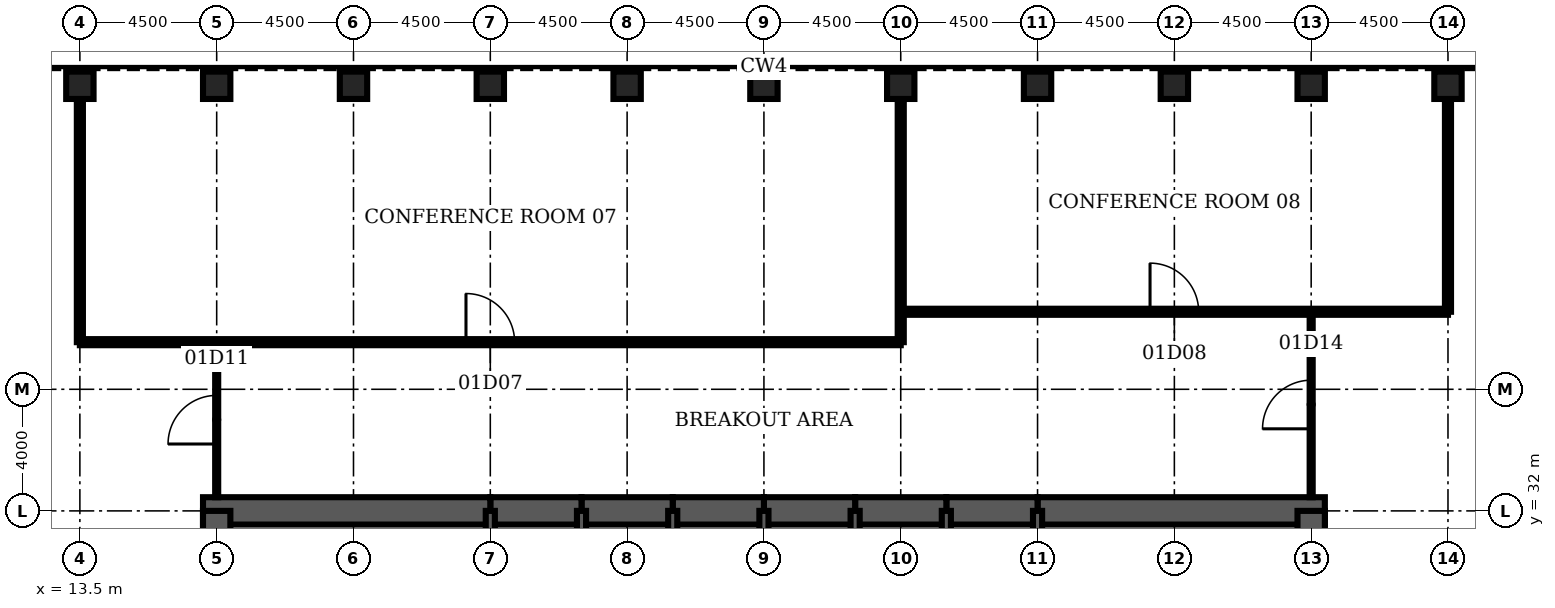
"""IFC4 building model, lengths in metres.
Left out: names, types, materials, properties, quantities, classifications, styles, units other than length and angle.
Written with IfcOpenShell. Run it as: python <this file> out.ifc"""

import sys

from ifc_helpers import new_model, si_unit, direction, frame, frame_2d, origin, origin_2d, place, context, subcontext, project, spatial, rectangle, hollow_rectangle, extrude, element, fill, save


model = new_model("IFC4")
c1 = context("Model", 3, precision=1e-05, world=origin(), true_north=direction((0.0, 1.0)))
c2 = subcontext(c1, "Body", "Model", "MODEL_VIEW")
j1 = project(units=[si_unit("LENGTHUNIT", "METRE"), si_unit("PLANEANGLEUNIT", "RADIAN")], contexts=[c1])
p1 = place(None, origin())
s1 = spatial("IfcSite", under=j1, at=p1, CompositionType="ELEMENT")
p2 = place(p1, origin())
s2 = spatial("IfcBuilding", under=s1, at=p2, CompositionType="ELEMENT")
p3 = place(p2, frame((0.0, 0.0, 6.0)))
s3 = spatial("IfcBuildingStorey", under=s2, at=p3, CompositionType="ELEMENT", Elevation=6.0)
for number, where, z_axis, x_axis in (
    (1, (58.5, 46.0, 0.0), (0.0, 0.0, 1.0), (0.0, 1.0, 0.0)),
    (2, (54.0, 46.0, 0.0), (0.0, 0.0, 1.0), (0.0, 1.0, 0.0)),
    (3, (49.5, 46.0, 0.0), (0.0, 0.0, 1.0), (0.0, 1.0, 0.0)),
    (4, (45.0, 46.0, 0.0), (0.0, 0.0, 1.0), (0.0, 1.0, 0.0)),
    (5, (40.5, 46.0, 0.0), (0.0, 0.0, 1.0), (0.0, 1.0, 0.0)),
    (6, (36.0, 46.0, 0.0), (0.0, 0.0, 1.0), (0.0, 1.0, 0.0)),
    (7, (31.5, 46.0, 0.0), (0.0, 0.0, 1.0), (0.0, 1.0, 0.0)),
    (8, (27.0, 46.0, 0.0), (0.0, 0.0, 1.0), (0.0, 1.0, 0.0)),
    (9, (22.5, 46.0, 0.0), (0.0, 0.0, 1.0), (0.0, 1.0, 0.0)),
    (10, (18.0, 46.0, 0.0), (0.0, 0.0, 1.0), (0.0, 1.0, 0.0)),
    (11, (13.5, 46.0, 0.0), (0.0, 0.0, 1.0), (0.0, 1.0, 0.0)),
):
    element("IfcColumn", number, at=place(p3, frame(where, z_axis=z_axis, x_axis=x_axis)), inside=s3, PredefinedType="COLUMN", context=c2, shape_type="SweptSolid", body=[
        extrude(hollow_rectangle(XDim=0.9, YDim=0.9, WallThickness=0.12, at=origin_2d()), origin(), (0.0, 0.0, 1.0), 7.0),
    ])
p4 = place(p3, frame((54.45, 32.0, 0.0), z_axis=(0.0, 0.0, 1.0), x_axis=(-1.0, 0.0, 0.0)))
e12 = element("IfcWall", 12, at=p4, inside=s3, PredefinedType="SHEAR", context=c2, shape_type="SweptSolid", body=[
    extrude(rectangle(XDim=9.45, YDim=0.9, at=frame_2d((4.725, 0.0))), origin(), (0.0, 0.0, 1.0), 7.0),
])
for number, where, z_axis, x_axis in (
    (13, (45.0, 32.0, 0.0), (0.0, 0.0, 1.0), (-1.0, 0.0, 0.0)),
    (14, (42.0, 32.0, 0.0), (0.0, 0.0, 1.0), (-1.0, 0.0, 0.0)),
    (15, (39.0, 32.0, 0.0), (0.0, 0.0, 1.0), (-1.0, 0.0, 0.0)),
    (16, (36.0, 32.0, 0.0), (0.0, 0.0, 1.0), (-1.0, 0.0, 0.0)),
    (17, (33.0, 32.0, 0.0), (0.0, 0.0, 1.0), (-1.0, 0.0, 0.0)),
    (18, (30.0, 32.0, 0.0), (0.0, 0.0, 1.0), (-1.0, 0.0, 0.0)),
):
    element("IfcWall", number, at=place(p3, frame(where, z_axis=z_axis, x_axis=x_axis)), inside=s3, PredefinedType="SHEAR", context=c2, shape_type="SweptSolid", body=[
        extrude(rectangle(XDim=3.0, YDim=0.9, at=frame_2d((1.5, 0.0))), origin(), (0.0, 0.0, 1.0), 7.0),
    ])
p5 = place(p3, frame((27.0, 32.0, 0.0), z_axis=(0.0, 0.0, 1.0), x_axis=(-1.0, 0.0, 0.0)))
e19 = element("IfcWall", 19, at=p5, inside=s3, PredefinedType="SHEAR", context=c2, shape_type="SweptSolid", body=[
    extrude(rectangle(XDim=9.45, YDim=0.9, at=frame_2d((4.725, 0.0))), origin(), (0.0, 0.0, 1.0), 7.0),
])
for number, where, z_axis, x_axis in (
    (20, (18.0, 32.0, 0.0), (0.0, 0.0, 1.0), (0.0, -1.0, 0.0)),
    (21, (54.0, 28.8, 0.0), (0.0, 0.0, 1.0), (0.0, 1.0, 0.0)),
):
    element("IfcWall", number, at=place(p3, frame(where, z_axis=z_axis, x_axis=x_axis)), inside=s3, PredefinedType="SHEAR", context=c2, shape_type="SweptSolid", body=[
        extrude(rectangle(XDim=3.2, YDim=0.9, at=frame_2d((1.6, 0.0))), origin(), (0.0, 0.0, 1.0), 7.0),
    ])
for number, where, z_axis, x_axis in (
    (22, (27.0, 28.8, 0.0), (0.0, 0.0, 1.0), (0.0, 1.0, 0.0)),
    (23, (30.0, 28.8, 0.0), (0.0, 0.0, 1.0), (0.0, 1.0, 0.0)),
    (24, (33.0, 28.8, 0.0), (0.0, 0.0, 1.0), (0.0, 1.0, 0.0)),
    (25, (36.0, 28.8, 0.0), (0.0, 0.0, 1.0), (0.0, 1.0, 0.0)),
    (26, (39.0, 28.8, 0.0), (0.0, 0.0, 1.0), (0.0, 1.0, 0.0)),
    (27, (42.0, 28.8, 0.0), (0.0, 0.0, 1.0), (0.0, 1.0, 0.0)),
    (28, (45.0, 28.8, 0.0), (0.0, 0.0, 1.0), (0.0, 1.0, 0.0)),
):
    element("IfcWall", number, at=place(p3, frame(where, z_axis=z_axis, x_axis=x_axis)), inside=s3, PredefinedType="SOLIDWALL", context=c2, shape_type="SweptSolid", body=[
        extrude(rectangle(XDim=3.2, YDim=0.3, at=frame_2d((1.6, 0.0))), origin(), (0.0, 0.0, 1.0), 7.0),
    ])
p6 = place(p3, frame((13.5, 37.55, 0.0), z_axis=(0.0, 0.0, 1.0), x_axis=(1.0, 0.0, 0.0)))
e29 = element("IfcWall", 29, at=p6, inside=s3, PredefinedType="PARTITIONING", context=c2, shape_type="SweptSolid", body=[
    extrude(rectangle(XDim=27.0, YDim=0.2, at=frame_2d((13.5, 0.0))), origin(), (0.0, 0.0, 1.0), 3.0),
])
p7 = place(p6, frame((12.7, 0.0, 0.0)))
e30 = element("IfcOpeningElement", 30, at=p7, cuts=e29, PredefinedType="OPENING", context=c2, shape_type="SweptSolid", body=[
    extrude(rectangle(XDim=1.6, YDim=2.1, at=frame_2d((0.8, 1.05))), frame((0.0, 0.11, 0.0), z_axis=(0.0, -1.0, 0.0), x_axis=(1.0, 0.0, 0.0)), (0.0, 0.0, 1.0), 0.22),
])
p8 = place(p3, frame((40.5, 38.55, 0.0), z_axis=(0.0, 0.0, 1.0), x_axis=(1.0, 0.0, 0.0)))
e31 = element("IfcWall", 31, at=p8, inside=s3, PredefinedType="PARTITIONING", context=c2, shape_type="SweptSolid", body=[
    extrude(rectangle(XDim=18.0, YDim=0.2, at=frame_2d((9.0, 0.0))), origin(), (0.0, 0.0, 1.0), 3.0),
])
p9 = place(p8, frame((8.2, 0.0, 0.0)))
e32 = element("IfcOpeningElement", 32, at=p9, cuts=e31, PredefinedType="OPENING", context=c2, shape_type="SweptSolid", body=[
    extrude(rectangle(XDim=1.6, YDim=2.1, at=frame_2d((0.8, 1.05))), frame((0.0, 0.11, 0.0), z_axis=(0.0, -1.0, 0.0), x_axis=(1.0, 0.0, 0.0)), (0.0, 0.0, 1.0), 0.22),
])
p10 = place(p3, frame((13.5, 37.55, 0.0), z_axis=(0.0, 0.0, 1.0), x_axis=(0.0, 1.0, 0.0)))
e33 = element("IfcWall", 33, at=p10, inside=s3, PredefinedType="PARTITIONING", context=c2, shape_type="SweptSolid", body=[
    extrude(rectangle(XDim=8.0, YDim=0.2, at=frame_2d((4.0, 0.0))), origin(), (0.0, 0.0, 1.0), 3.0),
])
p11 = place(p3, frame((18.0, 32.45, 0.0), z_axis=(0.0, 0.0, 1.0), x_axis=(0.0, 1.0, 0.0)))
e34 = element("IfcWall", 34, at=p11, inside=s3, PredefinedType="PARTITIONING", context=c2, shape_type="SweptSolid", body=[
    extrude(rectangle(XDim=5.1, YDim=0.1, at=frame_2d((2.55, 0.0))), origin(), (0.0, 0.0, 1.0), 3.0),
])
p12 = place(p11, frame((1.75, 0.0, 0.0)))
e35 = element("IfcOpeningElement", 35, at=p12, cuts=e34, PredefinedType="OPENING", context=c2, shape_type="SweptSolid", body=[
    extrude(rectangle(XDim=1.6, YDim=2.1, at=frame_2d((0.8, 1.05))), frame((0.0, 0.06, 0.0), z_axis=(0.0, -1.0, 0.0), x_axis=(1.0, 0.0, 0.0)), (0.0, 0.0, 1.0), 0.12),
])
p13 = place(p3, frame((40.5, 37.55, 0.0), z_axis=(0.0, 0.0, 1.0), x_axis=(0.0, 1.0, 0.0)))
e36 = element("IfcWall", 36, at=p13, inside=s3, PredefinedType="PARTITIONING", context=c2, shape_type="SweptSolid", body=[
    extrude(rectangle(XDim=8.0, YDim=0.2, at=frame_2d((4.0, 0.0))), origin(), (0.0, 0.0, 1.0), 3.0),
])
p14 = place(p3, frame((54.0, 32.45, 0.0), z_axis=(0.0, 0.0, 1.0), x_axis=(0.0, 1.0, 0.0)))
e37 = element("IfcWall", 37, at=p14, inside=s3, PredefinedType="PARTITIONING", context=c2, shape_type="SweptSolid", body=[
    extrude(rectangle(XDim=6.1, YDim=0.1, at=frame_2d((3.05, 0.0))), origin(), (0.0, 0.0, 1.0), 3.0),
])
p15 = place(p14, frame((2.25, 0.0, 0.0)))
e38 = element("IfcOpeningElement", 38, at=p15, cuts=e37, PredefinedType="OPENING", context=c2, shape_type="SweptSolid", body=[
    extrude(rectangle(XDim=1.6, YDim=2.1, at=frame_2d((0.8, 1.05))), frame((0.0, 0.06, 0.0), z_axis=(0.0, -1.0, 0.0), x_axis=(1.0, 0.0, 0.0)), (0.0, 0.0, 1.0), 0.12),
])
p16 = place(p3, frame((58.5, 38.55, 0.0), z_axis=(0.0, 0.0, 1.0), x_axis=(0.0, 1.0, 0.0)))
e39 = element("IfcWall", 39, at=p16, inside=s3, PredefinedType="PARTITIONING", context=c2, shape_type="SweptSolid", body=[
    extrude(rectangle(XDim=7.0, YDim=0.2, at=frame_2d((3.5, 0.0))), origin(), (0.0, 0.0, 1.0), 3.0),
])
p17 = place(p7, origin())
e40 = element("IfcDoor", 40, at=p17, inside=s3, OperationType="SINGLE_SWING_LEFT", PredefinedType="DOOR", context=c2, shape_type="SweptSolid", body=[
    extrude(rectangle(XDim=1.6, YDim=2.1, at=frame_2d((0.8, 1.05))), frame((0.0, 0.025, 0.0), z_axis=(0.0, -1.0, 0.0), x_axis=(1.0, 0.0, 0.0)), (0.0, 0.0, 1.0), 0.05),
])
fill(e30, e40)
p18 = place(p9, origin())
e41 = element("IfcDoor", 41, at=p18, inside=s3, OperationType="SINGLE_SWING_LEFT", PredefinedType="DOOR", context=c2, shape_type="SweptSolid", body=[
    extrude(rectangle(XDim=1.6, YDim=2.1, at=frame_2d((0.8, 1.05))), frame((0.0, 0.025, 0.0), z_axis=(0.0, -1.0, 0.0), x_axis=(1.0, 0.0, 0.0)), (0.0, 0.0, 1.0), 0.05),
])
fill(e32, e41)
p19 = place(p12, origin())
e42 = element("IfcDoor", 42, at=p19, inside=s3, OperationType="SINGLE_SWING_LEFT", PredefinedType="DOOR", context=c2, shape_type="SweptSolid", body=[
    extrude(rectangle(XDim=1.6, YDim=2.1, at=frame_2d((0.8, 1.05))), frame((0.0, 0.025, 0.0), z_axis=(0.0, -1.0, 0.0), x_axis=(1.0, 0.0, 0.0)), (0.0, 0.0, 1.0), 0.05),
])
fill(e35, e42)
p20 = place(p15, origin())
e43 = element("IfcDoor", 43, at=p20, inside=s3, OperationType="SINGLE_SWING_LEFT", PredefinedType="DOOR", context=c2, shape_type="SweptSolid", body=[
    extrude(rectangle(XDim=1.6, YDim=2.1, at=frame_2d((0.8, 1.05))), frame((0.0, 0.025, 0.0), z_axis=(0.0, -1.0, 0.0), x_axis=(1.0, 0.0, 0.0)), (0.0, 0.0, 1.0), 0.05),
])
fill(e38, e43)
save(model, sys.argv[1])
